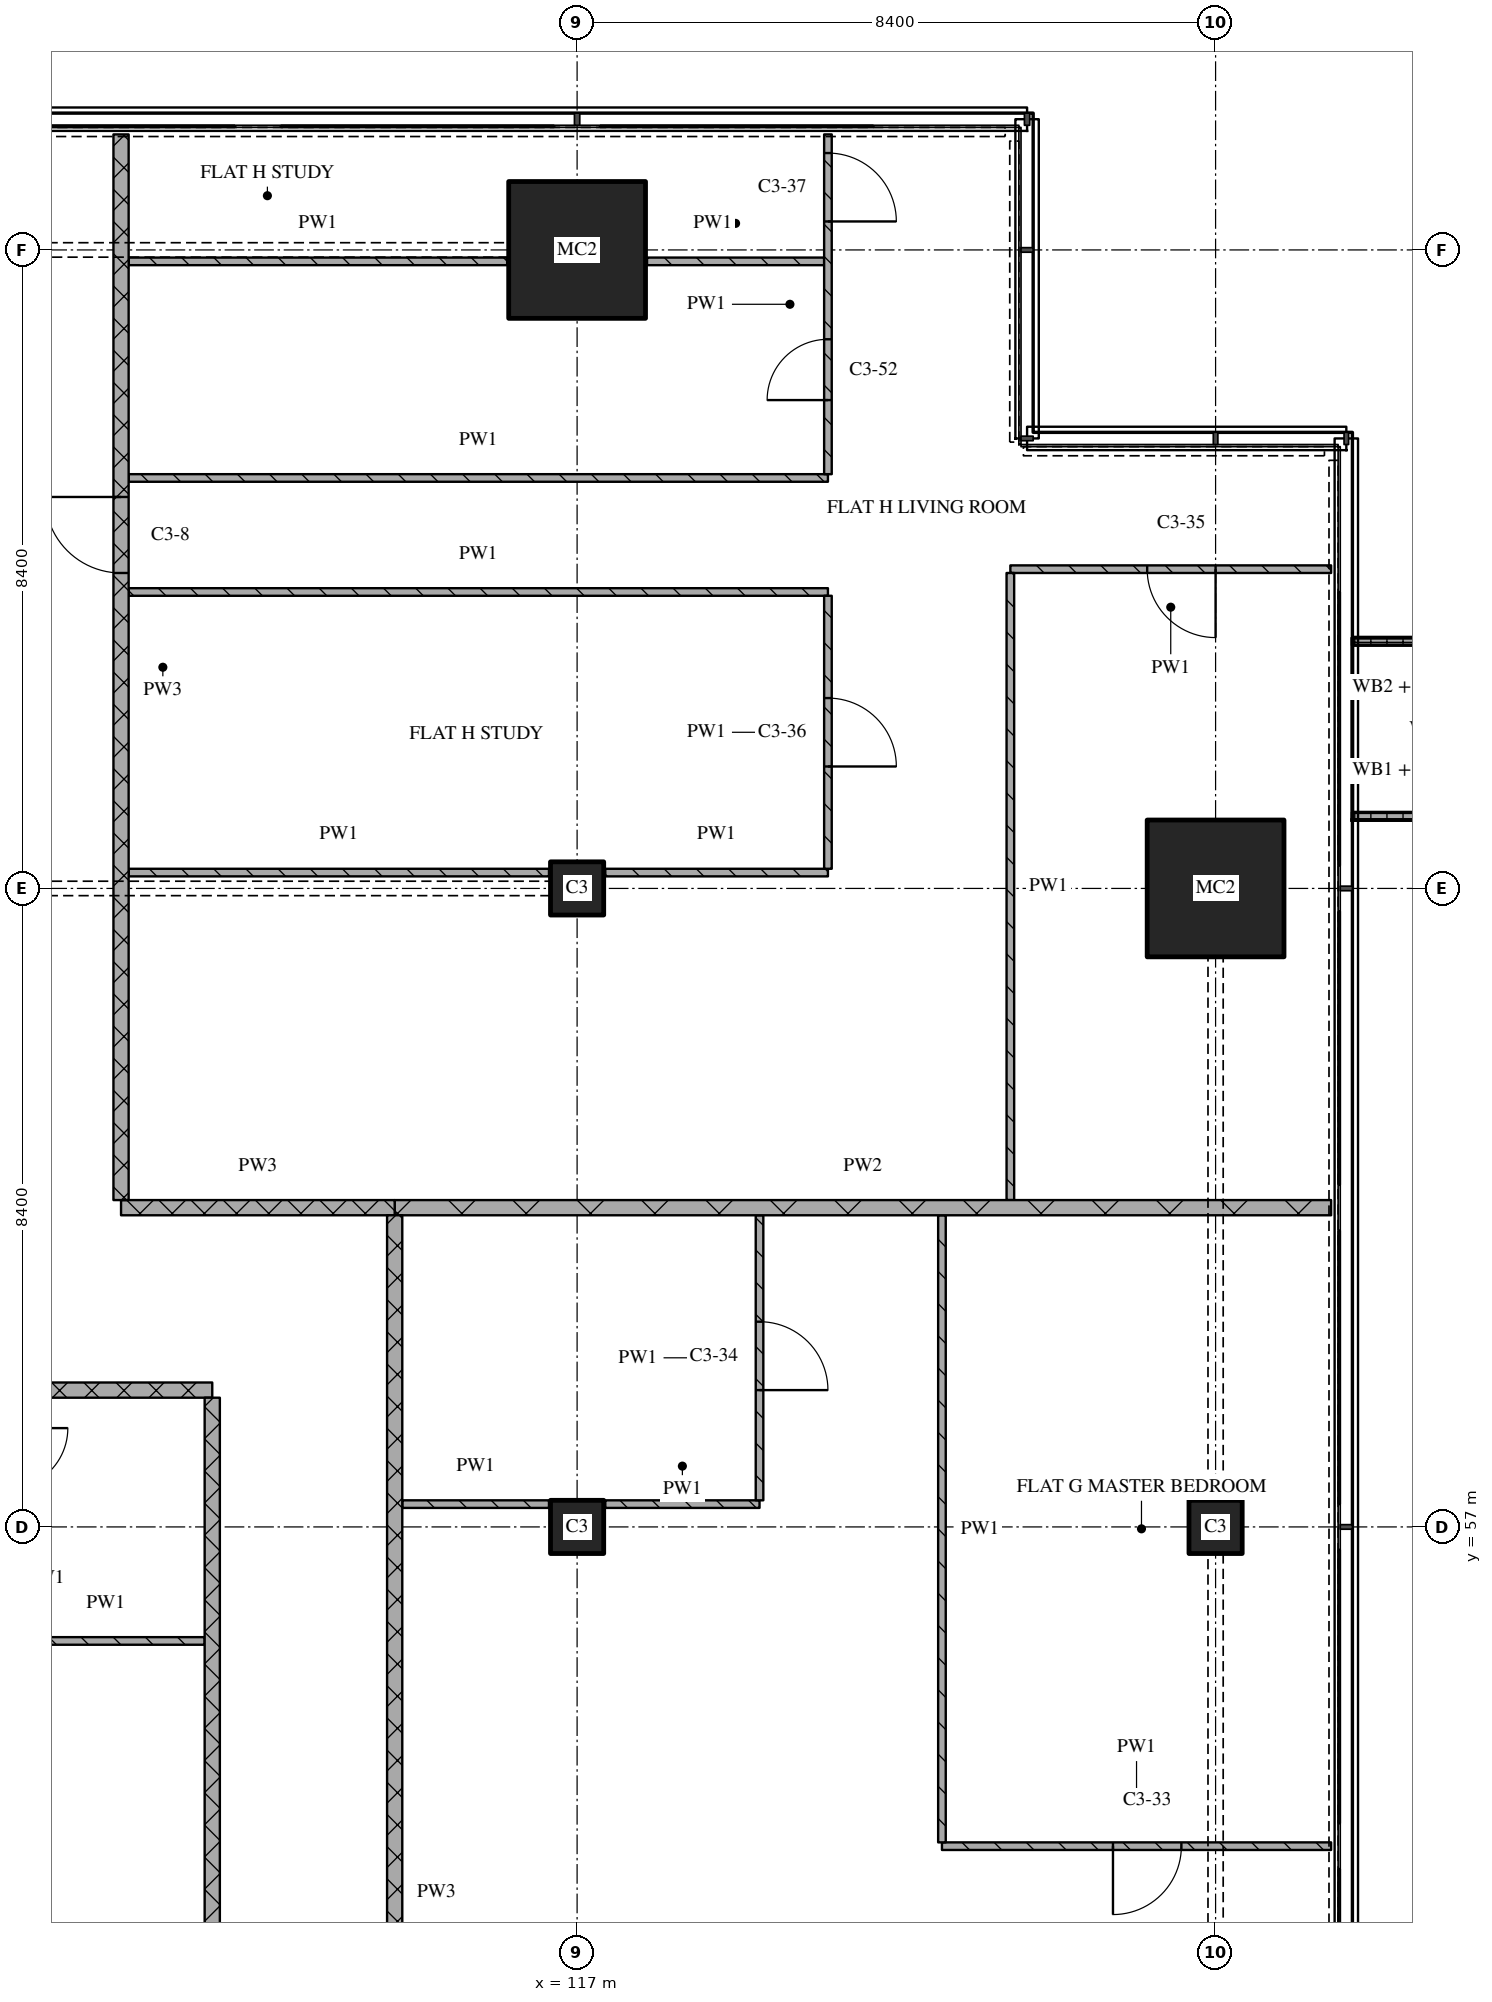
"""IFC4 building model, lengths in metres.
Left out: names, types, materials, properties, quantities, classifications, styles, units other than length and angle.
Written with IfcOpenShell. Run it as: python <this file> out.ifc"""

import sys

from ifc_helpers import new_model, si_unit, direction, frame, frame_2d, origin, origin_2d, place, context, subcontext, project, spatial, polyline, rectangle, outline, extrude, element, fill, save


model = new_model("IFC4")
c1 = context("Model", 3, precision=1e-05, world=origin(), true_north=direction((0.0, 1.0)))
c2 = subcontext(c1, "Body", "Model", "MODEL_VIEW")
j1 = project(units=[si_unit("LENGTHUNIT", "METRE"), si_unit("PLANEANGLEUNIT", "RADIAN")], contexts=[c1])
p1 = place(None, origin())
s1 = spatial("IfcSite", under=j1, at=p1, CompositionType="ELEMENT")
p2 = place(p1, origin())
s2 = spatial("IfcBuilding", under=s1, at=p2, CompositionType="ELEMENT")
p3 = place(p2, frame((0.0, 0.0, 176.25)))
s3 = spatial("IfcBuildingStorey", under=s2, at=p3, CompositionType="ELEMENT", Elevation=176.25)
for number, where, z_axis, x_axis in (
    (1, (117.0, 57.0, 0.0), (0.0, 0.0, 1.0), (1.0, 0.0, 0.0)),
    (2, (117.0, 65.4, 0.0), (0.0, 0.0, 1.0), (1.0, 0.0, 0.0)),
):
    element("IfcColumn", number, at=place(p3, frame(where, z_axis=z_axis, x_axis=x_axis)), inside=s3, PredefinedType="COLUMN", context=c2, shape_type="SweptSolid", body=[
        extrude(rectangle(XDim=0.7, YDim=0.7, at=origin_2d()), origin(), (0.0, 0.0, 1.0), 3.6),
    ])
p4 = place(p3, frame((117.0, 73.8, 0.0), z_axis=(0.0, 0.0, 1.0), x_axis=(1.0, 0.0, 0.0)))
e3 = element("IfcColumn", 3, at=p4, inside=s3, PredefinedType="COLUMN", context=c2, shape_type="SweptSolid", body=[
    extrude(rectangle(XDim=1.8, YDim=1.8, at=origin_2d()), origin(), (0.0, 0.0, 1.0), 3.6),
])
p5 = place(p3, frame((125.4, 57.0, 0.0), z_axis=(0.0, 0.0, 1.0), x_axis=(1.0, 0.0, 0.0)))
e4 = element("IfcColumn", 4, at=p5, inside=s3, PredefinedType="COLUMN", context=c2, shape_type="SweptSolid", body=[
    extrude(rectangle(XDim=0.7, YDim=0.7, at=origin_2d()), origin(), (0.0, 0.0, 1.0), 3.6),
])
p6 = place(p3, frame((125.4, 65.4, 0.0), z_axis=(0.0, 0.0, 1.0), x_axis=(1.0, 0.0, 0.0)))
e5 = element("IfcColumn", 5, at=p6, inside=s3, PredefinedType="COLUMN", context=c2, shape_type="SweptSolid", body=[
    extrude(rectangle(XDim=1.8, YDim=1.8, at=origin_2d()), origin(), (0.0, 0.0, 1.0), 3.6),
])
p7 = place(p3, origin())
e6 = element("IfcWall", 6, at=p7, inside=s3, PredefinedType="SOLIDWALL", context=c2, shape_type="SweptSolid", body=[
    extrude(outline(polyline([(127.2, 66.3), (127.2, 66.4), (128.7, 66.4), (128.7, 68.6), (127.2, 68.6), (127.2, 68.7), (128.8, 68.7), (128.8, 66.3), (127.2, 66.3)])), origin(), (0.0, 0.0, 1.0), 1.0),
])
p8 = place(p3, frame((121.8, 52.8, 0.0), z_axis=(0.0, 0.0, 1.0), x_axis=(1.0, 0.0, 0.0)))
e7 = element("IfcWall", 7, at=p8, inside=s3, PredefinedType="PARTITIONING", context=c2, shape_type="SweptSolid", body=[
    extrude(rectangle(XDim=5.12, YDim=0.1, at=frame_2d((2.56, 0.0))), origin(), (0.0, 0.0, 1.0), 3.32),
])
p9 = place(p8, frame((2.25, 0.0, 0.0)))
e8 = element("IfcOpeningElement", 8, at=p9, cuts=e7, PredefinedType="OPENING", context=c2, shape_type="SweptSolid", body=[
    extrude(rectangle(XDim=0.9, YDim=2.1, at=frame_2d((0.45, 1.05))), frame((0.0, 0.06, 0.0), z_axis=(0.0, -1.0, 0.0), x_axis=(1.0, 0.0, 0.0)), (0.0, 0.0, 1.0), 0.12),
])
p10 = place(p3, frame((109.5, 55.5, 0.0), z_axis=(0.0, 0.0, 1.0), x_axis=(1.0, 0.0, 0.0)))
e9 = element("IfcWall", 9, at=p10, inside=s3, PredefinedType="PARTITIONING", context=c2, shape_type="SweptSolid", body=[
    extrude(rectangle(XDim=2.6, YDim=0.1, at=frame_2d((1.3, 0.0))), origin(), (0.0, 0.0, 1.0), 3.32),
])
p11 = place(p3, frame((114.7, 57.3, 0.0), z_axis=(0.0, 0.0, 1.0), x_axis=(1.0, 0.0, 0.0)))
e10 = element("IfcWall", 10, at=p11, inside=s3, PredefinedType="PARTITIONING", context=c2, shape_type="SweptSolid", body=[
    extrude(rectangle(XDim=1.93, YDim=0.1, at=frame_2d((0.965, 0.0))), origin(), (0.0, 0.0, 1.0), 3.32),
])
p12 = place(p3, frame((117.37, 57.3, 0.0), z_axis=(0.0, 0.0, 1.0), x_axis=(1.0, 0.0, 0.0)))
e11 = element("IfcWall", 11, at=p12, inside=s3, PredefinedType="PARTITIONING", context=c2, shape_type="SweptSolid", body=[
    extrude(rectangle(XDim=2.03, YDim=0.1, at=frame_2d((1.015, 0.0))), origin(), (0.0, 0.0, 1.0), 3.32),
])
p13 = place(p3, frame((112.2, 58.8, 0.0), z_axis=(0.0, 0.0, 1.0), x_axis=(-1.0, 0.0, 0.0)))
e12 = element("IfcWall", 12, at=p13, inside=s3, PredefinedType="PARTITIONING", context=c2, shape_type="SweptSolid", body=[
    extrude(rectangle(XDim=10.8, YDim=0.2, at=frame_2d((5.4, 0.0))), origin(), (0.0, 0.0, 1.0), 3.32),
])
p14 = place(p13, frame((2.85, 0.0, 0.0)))
e13 = element("IfcOpeningElement", 13, at=p14, cuts=e12, PredefinedType="OPENING", context=c2, shape_type="SweptSolid", body=[
    extrude(rectangle(XDim=1.0, YDim=2.1, at=frame_2d((0.5, 1.05))), frame((0.0, 0.11, 0.0), z_axis=(0.0, -1.0, 0.0), x_axis=(1.0, 0.0, 0.0)), (0.0, 0.0, 1.0), 0.22),
])
p15 = place(p3, frame((111.0, 61.2, 0.0), z_axis=(0.0, 0.0, 1.0), x_axis=(1.0, 0.0, 0.0)))
e14 = element("IfcWall", 14, at=p15, inside=s3, PredefinedType="PARTITIONING", context=c2, shape_type="SweptSolid", body=[
    extrude(rectangle(XDim=3.6, YDim=0.2, at=frame_2d((1.8, 0.0))), origin(), (0.0, 0.0, 1.0), 3.32),
])
p16 = place(p3, frame((114.6, 61.2, 0.0), z_axis=(0.0, 0.0, 1.0), x_axis=(1.0, 0.0, 0.0)))
e15 = element("IfcWall", 15, at=p16, inside=s3, PredefinedType="PARTITIONING", context=c2, shape_type="SweptSolid", body=[
    extrude(rectangle(XDim=12.32, YDim=0.2, at=frame_2d((6.16, 0.0))), origin(), (0.0, 0.0, 1.0), 3.32),
])
p17 = place(p3, frame((111.1, 65.609, 0.0), z_axis=(0.0, 0.0, 1.0), x_axis=(1.0, 0.0, 0.0)))
e16 = element("IfcWall", 16, at=p17, inside=s3, PredefinedType="PARTITIONING", context=c2, shape_type="SweptSolid", body=[
    extrude(rectangle(XDim=5.53, YDim=0.1, at=frame_2d((2.765, 0.0))), origin(), (0.0, 0.0, 1.0), 3.32),
])
p18 = place(p3, frame((117.37, 65.609, 0.0), z_axis=(0.0, 0.0, 1.0), x_axis=(1.0, 0.0, 0.0)))
e17 = element("IfcWall", 17, at=p18, inside=s3, PredefinedType="PARTITIONING", context=c2, shape_type="SweptSolid", body=[
    extrude(rectangle(XDim=2.93, YDim=0.1, at=frame_2d((1.465, 0.0))), origin(), (0.0, 0.0, 1.0), 3.32),
])
p19 = place(p3, frame((111.1, 69.3, 0.0), z_axis=(0.0, 0.0, 1.0), x_axis=(1.0, 0.0, 0.0)))
e18 = element("IfcWall", 18, at=p19, inside=s3, PredefinedType="PARTITIONING", context=c2, shape_type="SweptSolid", body=[
    extrude(rectangle(XDim=9.2, YDim=0.1, at=frame_2d((4.6, 0.0))), origin(), (0.0, 0.0, 1.0), 3.32),
])
p20 = place(p3, frame((126.92, 69.6, 0.0), z_axis=(0.0, 0.0, 1.0), x_axis=(-1.0, 0.0, 0.0)))
e19 = element("IfcWall", 19, at=p20, inside=s3, PredefinedType="PARTITIONING", context=c2, shape_type="SweptSolid", body=[
    extrude(rectangle(XDim=4.22, YDim=0.1, at=frame_2d((2.11, 0.0))), origin(), (0.0, 0.0, 1.0), 3.32),
])
p21 = place(p20, frame((1.52, 0.0, 0.0)))
e20 = element("IfcOpeningElement", 20, at=p21, cuts=e19, PredefinedType="OPENING", context=c2, shape_type="SweptSolid", body=[
    extrude(rectangle(XDim=0.9, YDim=2.1, at=frame_2d((0.45, 1.05))), frame((0.0, 0.06, 0.0), z_axis=(0.0, -1.0, 0.0), x_axis=(1.0, 0.0, 0.0)), (0.0, 0.0, 1.0), 0.12),
])
p22 = place(p3, frame((111.1, 70.8, 0.0), z_axis=(0.0, 0.0, 1.0), x_axis=(1.0, 0.0, 0.0)))
e21 = element("IfcWall", 21, at=p22, inside=s3, PredefinedType="PARTITIONING", context=c2, shape_type="SweptSolid", body=[
    extrude(rectangle(XDim=9.2, YDim=0.1, at=frame_2d((4.6, 0.0))), origin(), (0.0, 0.0, 1.0), 3.32),
])
p23 = place(p3, frame((111.1, 73.649, 0.0), z_axis=(0.0, 0.0, 1.0), x_axis=(1.0, 0.0, 0.0)))
e22 = element("IfcWall", 22, at=p23, inside=s3, PredefinedType="PARTITIONING", context=c2, shape_type="SweptSolid", body=[
    extrude(rectangle(XDim=4.98, YDim=0.1, at=frame_2d((2.49, 0.0))), origin(), (0.0, 0.0, 1.0), 3.32),
])
p24 = place(p3, frame((117.92, 73.649, 0.0), z_axis=(0.0, 0.0, 1.0), x_axis=(1.0, 0.0, 0.0)))
e23 = element("IfcWall", 23, at=p24, inside=s3, PredefinedType="PARTITIONING", context=c2, shape_type="SweptSolid", body=[
    extrude(rectangle(XDim=2.33, YDim=0.1, at=frame_2d((1.165, 0.0))), origin(), (0.0, 0.0, 1.0), 3.32),
])
p25 = place(p3, frame((111.0, 75.32, 0.0), z_axis=(0.0, 0.0, 1.0), x_axis=(0.0, -1.0, 0.0)))
e24 = element("IfcWall", 24, at=p25, inside=s3, PredefinedType="PARTITIONING", context=c2, shape_type="SweptSolid", body=[
    extrude(rectangle(XDim=14.02, YDim=0.2, at=frame_2d((7.01, 0.0))), origin(), (0.0, 0.0, 1.0), 3.32),
])
p26 = place(p25, frame((4.77, 0.0, 0.0)))
e25 = element("IfcOpeningElement", 25, at=p26, cuts=e24, PredefinedType="OPENING", context=c2, shape_type="SweptSolid", body=[
    extrude(rectangle(XDim=1.0, YDim=2.1, at=frame_2d((0.5, 1.05))), frame((0.0, 0.11, 0.0), z_axis=(0.0, -1.0, 0.0), x_axis=(1.0, 0.0, 0.0)), (0.0, 0.0, 1.0), 0.22),
])
p27 = place(p3, frame((112.2, 58.7, 0.0), z_axis=(0.0, 0.0, 1.0), x_axis=(0.0, -1.0, 0.0)))
e26 = element("IfcWall", 26, at=p27, inside=s3, PredefinedType="PARTITIONING", context=c2, shape_type="SweptSolid", body=[
    extrude(rectangle(XDim=15.4, YDim=0.2, at=frame_2d((7.7, 0.0))), origin(), (0.0, 0.0, 1.0), 3.32),
])
p28 = place(p3, frame((114.6, 61.1, 0.0), z_axis=(0.0, 0.0, 1.0), x_axis=(0.0, -1.0, 0.0)))
e27 = element("IfcWall", 27, at=p28, inside=s3, PredefinedType="PARTITIONING", context=c2, shape_type="SweptSolid", body=[
    extrude(rectangle(XDim=17.8, YDim=0.2, at=frame_2d((8.9, 0.0))), origin(), (0.0, 0.0, 1.0), 3.32),
])
p29 = place(p3, frame((119.4, 57.35, 0.0), z_axis=(0.0, 0.0, 1.0), x_axis=(0.0, 1.0, 0.0)))
e28 = element("IfcWall", 28, at=p29, inside=s3, PredefinedType="PARTITIONING", context=c2, shape_type="SweptSolid", body=[
    extrude(rectangle(XDim=3.75, YDim=0.1, at=frame_2d((1.875, 0.0))), origin(), (0.0, 0.0, 1.0), 3.32),
])
p30 = place(p29, frame((1.45, 0.0, 0.0)))
e29 = element("IfcOpeningElement", 29, at=p30, cuts=e28, PredefinedType="OPENING", context=c2, shape_type="SweptSolid", body=[
    extrude(rectangle(XDim=0.9, YDim=2.1, at=frame_2d((0.45, 1.05))), frame((0.0, 0.06, 0.0), z_axis=(0.0, -1.0, 0.0), x_axis=(1.0, 0.0, 0.0)), (0.0, 0.0, 1.0), 0.12),
])
p31 = place(p3, frame((120.3, 65.659, 0.0), z_axis=(0.0, 0.0, 1.0), x_axis=(0.0, 1.0, 0.0)))
e30 = element("IfcWall", 30, at=p31, inside=s3, PredefinedType="PARTITIONING", context=c2, shape_type="SweptSolid", body=[
    extrude(rectangle(XDim=3.591, YDim=0.1, at=frame_2d((1.796, 0.0))), origin(), (0.0, 0.0, 1.0), 3.32),
])
p32 = place(p31, frame((1.346, 0.0, 0.0)))
e31 = element("IfcOpeningElement", 31, at=p32, cuts=e30, PredefinedType="OPENING", context=c2, shape_type="SweptSolid", body=[
    extrude(rectangle(XDim=0.9, YDim=2.1, at=frame_2d((0.45, 1.05))), frame((0.0, 0.06, 0.0), z_axis=(0.0, -1.0, 0.0), x_axis=(1.0, 0.0, 0.0)), (0.0, 0.0, 1.0), 0.12),
])
p33 = place(p3, frame((120.3, 70.85, 0.0), z_axis=(0.0, 0.0, 1.0), x_axis=(0.0, 1.0, 0.0)))
e32 = element("IfcWall", 32, at=p33, inside=s3, PredefinedType="PARTITIONING", context=c2, shape_type="SweptSolid", body=[
    extrude(rectangle(XDim=4.47, YDim=0.1, at=frame_2d((2.235, 0.0))), origin(), (0.0, 0.0, 1.0), 3.32),
])
p34 = place(p33, frame((0.975, 0.0, 0.0)))
e33 = element("IfcOpeningElement", 33, at=p34, cuts=e32, PredefinedType="OPENING", context=c2, shape_type="SweptSolid", body=[
    extrude(rectangle(XDim=0.8, YDim=2.1, at=frame_2d((0.4, 1.05))), frame((0.0, 0.06, 0.0), z_axis=(0.0, -1.0, 0.0), x_axis=(1.0, 0.0, 0.0)), (0.0, 0.0, 1.0), 0.12),
])
p35 = place(p33, frame((3.325, 0.0, 0.0)))
e34 = element("IfcOpeningElement", 34, at=p35, cuts=e32, PredefinedType="OPENING", context=c2, shape_type="SweptSolid", body=[
    extrude(rectangle(XDim=0.9, YDim=2.1, at=frame_2d((0.45, 1.05))), frame((0.0, 0.06, 0.0), z_axis=(0.0, -1.0, 0.0), x_axis=(1.0, 0.0, 0.0)), (0.0, 0.0, 1.0), 0.12),
])
for number, where, z_axis, x_axis in (
    (35, (121.8, 61.1, 0.0), (0.0, 0.0, 1.0), (0.0, -1.0, 0.0)),
    (36, (122.7, 69.55, 0.0), (0.0, 0.0, 1.0), (0.0, -1.0, 0.0)),
):
    element("IfcWall", number, at=place(p3, frame(where, z_axis=z_axis, x_axis=x_axis)), inside=s3, PredefinedType="PARTITIONING", context=c2, shape_type="SweptSolid", body=[
        extrude(rectangle(XDim=8.25, YDim=0.1, at=frame_2d((4.125, 0.0))), origin(), (0.0, 0.0, 1.0), 3.32),
    ])
p36 = place(p9, origin())
e37 = element("IfcDoor", 37, at=p36, inside=s3, OperationType="SINGLE_SWING_RIGHT", PredefinedType="DOOR", context=c2, shape_type="SweptSolid", body=[
    extrude(rectangle(XDim=0.9, YDim=2.1, at=frame_2d((0.45, 1.05))), frame((0.0, 0.025, 0.0), z_axis=(0.0, -1.0, 0.0), x_axis=(1.0, 0.0, 0.0)), (0.0, 0.0, 1.0), 0.05),
])
fill(e8, e37)
p37 = place(p21, origin())
e38 = element("IfcDoor", 38, at=p37, inside=s3, OperationType="SINGLE_SWING_LEFT", PredefinedType="DOOR", context=c2, shape_type="SweptSolid", body=[
    extrude(rectangle(XDim=0.9, YDim=2.1, at=frame_2d((0.45, 1.05))), frame((0.0, 0.025, 0.0), z_axis=(0.0, -1.0, 0.0), x_axis=(1.0, 0.0, 0.0)), (0.0, 0.0, 1.0), 0.05),
])
fill(e20, e38)
p38 = place(p26, origin())
e39 = element("IfcDoor", 39, at=p38, inside=s3, OperationType="SINGLE_SWING_RIGHT", PredefinedType="DOOR", context=c2, shape_type="SweptSolid", body=[
    extrude(rectangle(XDim=1.0, YDim=2.1, at=frame_2d((0.5, 1.05))), frame((0.0, 0.025, 0.0), z_axis=(0.0, -1.0, 0.0), x_axis=(1.0, 0.0, 0.0)), (0.0, 0.0, 1.0), 0.05),
])
fill(e25, e39)
p39 = place(p30, origin())
e40 = element("IfcDoor", 40, at=p39, inside=s3, OperationType="SINGLE_SWING_RIGHT", PredefinedType="DOOR", context=c2, shape_type="SweptSolid", body=[
    extrude(rectangle(XDim=0.9, YDim=2.1, at=frame_2d((0.45, 1.05))), frame((0.0, 0.025, 0.0), z_axis=(0.0, -1.0, 0.0), x_axis=(1.0, 0.0, 0.0)), (0.0, 0.0, 1.0), 0.05),
])
fill(e29, e40)
p40 = place(p32, origin())
e41 = element("IfcDoor", 41, at=p40, inside=s3, OperationType="SINGLE_SWING_RIGHT", PredefinedType="DOOR", context=c2, shape_type="SweptSolid", body=[
    extrude(rectangle(XDim=0.9, YDim=2.1, at=frame_2d((0.45, 1.05))), frame((0.0, 0.025, 0.0), z_axis=(0.0, -1.0, 0.0), x_axis=(1.0, 0.0, 0.0)), (0.0, 0.0, 1.0), 0.05),
])
fill(e31, e41)
p41 = place(p34, origin())
e42 = element("IfcDoor", 42, at=p41, inside=s3, OperationType="SINGLE_SWING_LEFT", PredefinedType="DOOR", context=c2, shape_type="SweptSolid", body=[
    extrude(rectangle(XDim=0.8, YDim=2.1, at=frame_2d((0.4, 1.05))), frame((0.0, 0.025, 0.0), z_axis=(0.0, -1.0, 0.0), x_axis=(1.0, 0.0, 0.0)), (0.0, 0.0, 1.0), 0.05),
])
fill(e33, e42)
p42 = place(p35, origin())
e43 = element("IfcDoor", 43, at=p42, inside=s3, OperationType="SINGLE_SWING_RIGHT", PredefinedType="DOOR", context=c2, shape_type="SweptSolid", body=[
    extrude(rectangle(XDim=0.9, YDim=2.1, at=frame_2d((0.45, 1.05))), frame((0.0, 0.025, 0.0), z_axis=(0.0, -1.0, 0.0), x_axis=(1.0, 0.0, 0.0)), (0.0, 0.0, 1.0), 0.05),
])
fill(e34, e43)
save(model, sys.argv[1])
